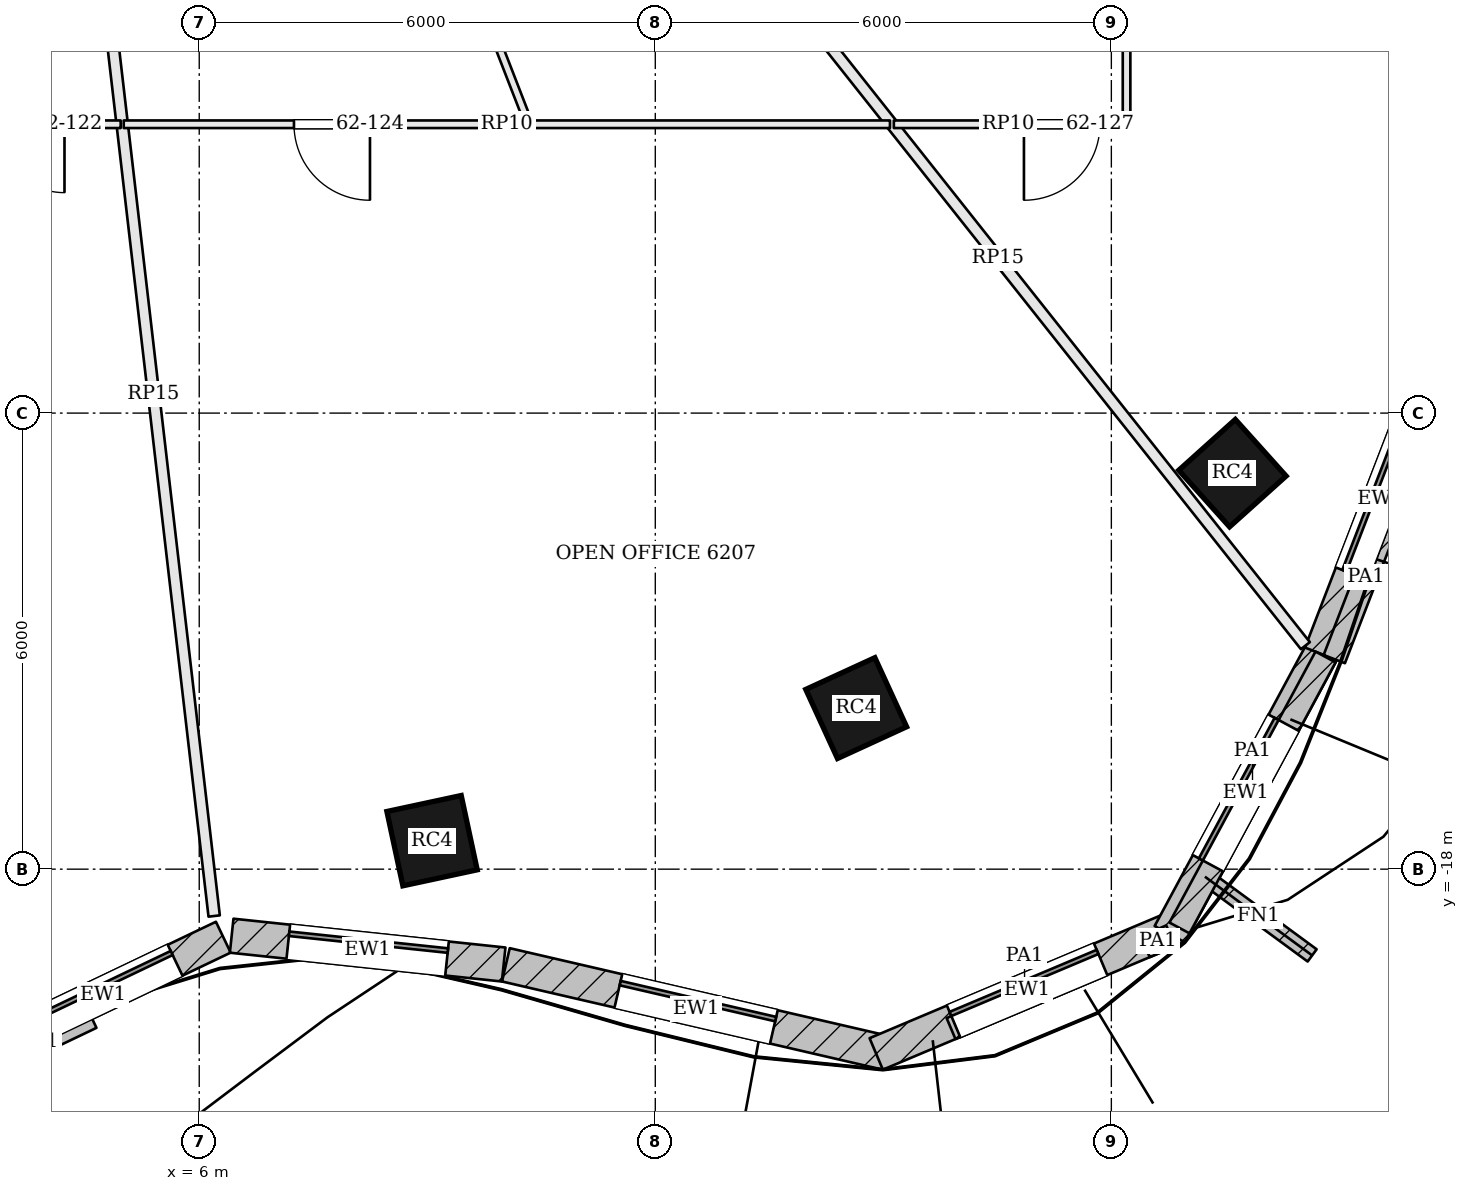
"""IFC4 building model, lengths in metres.
Left out: names, types, materials, properties, quantities, classifications, styles, units other than length and angle.
Written with IfcOpenShell. Run it as: python <this file> out.ifc"""

import sys

from ifc_helpers import new_model, si_unit, direction, frame, frame_2d, origin, origin_2d, place, context, subcontext, project, spatial, rectangle, extrude, element, fill, save


model = new_model("IFC4")
c1 = context("Model", 3, precision=1e-05, world=origin(), true_north=direction((0.0, 1.0)))
c2 = subcontext(c1, "Body", "Model", "MODEL_VIEW")
j1 = project(units=[si_unit("LENGTHUNIT", "METRE"), si_unit("PLANEANGLEUNIT", "RADIAN")], contexts=[c1])
p1 = place(None, origin())
s1 = spatial("IfcSite", under=j1, at=p1, CompositionType="ELEMENT")
p2 = place(p1, origin())
s2 = spatial("IfcBuilding", under=s1, at=p2, CompositionType="ELEMENT")
p3 = place(p2, frame((0.0, 0.0, 252.6)))
s3 = spatial("IfcBuildingStorey", under=s2, at=p3, CompositionType="ELEMENT", Elevation=252.6)
for number, where, z_axis, x_axis in (
    (1, (9.063, -17.625, 0.0), (0.0, 0.0, 1.0), (0.978, 0.21, 0.0)),
    (2, (14.643, -15.881, 0.0), (0.0, 0.0, 1.0), (0.909, 0.417, 0.0)),
    (3, (19.593, -12.79, 0.0), (0.0, 0.0, 1.0), (0.744, 0.668, 0.0)),
):
    element("IfcColumn", number, at=place(p3, frame(where, z_axis=z_axis, x_axis=x_axis)), inside=s3, PredefinedType="COLUMN", context=c2, shape_type="SweptSolid", body=[
        extrude(rectangle(XDim=1.0, YDim=1.0, at=origin_2d()), origin(), (0.0, 0.0, 1.0), 3.9),
    ])
p4 = place(p3, frame((3.154, -20.406, 0.0), z_axis=(0.0, 0.0, 1.0), x_axis=(0.902333313, 0.431038968367, 0.0)))
e4 = element("IfcWall", 4, at=p4, inside=s3, PredefinedType="SOLIDWALL", context=c2, shape_type="SweptSolid", body=[
    extrude(rectangle(XDim=3.505, YDim=0.45, at=frame_2d((1.753, 0.0))), origin(), (0.0, 0.0, 1.0), 3.7),
])
p5 = place(p4, frame((0.703, 0.0, 0.9)))
e5 = element("IfcOpeningElement", 5, at=p5, cuts=e4, PredefinedType="OPENING", context=c2, shape_type="SweptSolid", body=[
    extrude(rectangle(XDim=2.1, YDim=2.3, at=frame_2d((1.05, 1.15))), frame((0.0, 0.235, 0.0), z_axis=(0.0, -1.0, 0.0), x_axis=(1.0, 0.0, 0.0)), (0.0, 0.0, 1.0), 0.47),
])
p6 = place(p3, frame((6.427, -18.875, 0.0), z_axis=(0.0, 0.0, 1.0), x_axis=(0.994433468803, -0.10536638992, 0.0)))
e6 = element("IfcWall", 6, at=p6, inside=s3, PredefinedType="SOLIDWALL", context=c2, shape_type="SweptSolid", body=[
    extrude(rectangle(XDim=3.598, YDim=0.45, at=frame_2d((1.799, 0.0))), origin(), (0.0, 0.0, 1.0), 3.7),
])
p7 = place(p6, frame((0.749, 0.0, 0.9)))
e7 = element("IfcOpeningElement", 7, at=p7, cuts=e6, PredefinedType="OPENING", context=c2, shape_type="SweptSolid", body=[
    extrude(rectangle(XDim=2.1, YDim=2.3, at=frame_2d((1.05, 1.15))), frame((0.0, 0.235, 0.0), z_axis=(0.0, -1.0, 0.0), x_axis=(1.0, 0.0, 0.0)), (0.0, 0.0, 1.0), 0.47),
])
p8 = place(p3, frame((10.034, -19.259, 0.0), z_axis=(0.0, 0.0, 1.0), x_axis=(0.974223567844, -0.225584662283, 0.0)))
e8 = element("IfcWall", 8, at=p8, inside=s3, PredefinedType="SOLIDWALL", context=c2, shape_type="SweptSolid", body=[
    extrude(rectangle(XDim=5.139, YDim=0.45, at=frame_2d((2.569, 0.0))), origin(), (0.0, 0.0, 1.0), 3.7),
])
p9 = place(p8, frame((1.519, 0.0, 0.9)))
e9 = element("IfcOpeningElement", 9, at=p9, cuts=e8, PredefinedType="OPENING", context=c2, shape_type="SweptSolid", body=[
    extrude(rectangle(XDim=2.1, YDim=2.3, at=frame_2d((1.05, 1.15))), frame((0.0, 0.235, 0.0), z_axis=(0.0, -1.0, 0.0), x_axis=(1.0, 0.0, 0.0)), (0.0, 0.0, 1.0), 0.47),
])
p10 = place(p3, frame((14.906, -20.431, 0.0), z_axis=(0.0, 0.0, 1.0), x_axis=(0.921435803521, 0.388530642279, 0.0)))
e10 = element("IfcWall", 10, at=p10, inside=s3, PredefinedType="SOLIDWALL", context=c2, shape_type="SweptSolid", body=[
    extrude(rectangle(XDim=4.309, YDim=0.45, at=frame_2d((2.154, 0.0))), origin(), (0.0, 0.0, 1.0), 3.7),
])
p11 = place(p10, frame((1.104, 0.0, 0.9)))
e11 = element("IfcOpeningElement", 11, at=p11, cuts=e10, PredefinedType="OPENING", context=c2, shape_type="SweptSolid", body=[
    extrude(rectangle(XDim=2.1, YDim=2.3, at=frame_2d((1.05, 1.15))), frame((0.0, 0.235, 0.0), z_axis=(0.0, -1.0, 0.0), x_axis=(1.0, 0.0, 0.0)), (0.0, 0.0, 1.0), 0.47),
])
p12 = place(p3, frame((18.767, -18.854, 0.0), z_axis=(0.0, 0.0, 1.0), x_axis=(0.474475888716, 0.880268499395, 0.0)))
e12 = element("IfcWall", 12, at=p12, inside=s3, PredefinedType="SOLIDWALL", context=c2, shape_type="SweptSolid", body=[
    extrude(rectangle(XDim=4.219, YDim=0.45, at=frame_2d((2.11, 0.0))), origin(), (0.0, 0.0, 1.0), 3.7),
])
p13 = place(p12, frame((1.06, 0.0, 0.9)))
e13 = element("IfcOpeningElement", 13, at=p13, cuts=e12, PredefinedType="OPENING", context=c2, shape_type="SweptSolid", body=[
    extrude(rectangle(XDim=2.1, YDim=2.3, at=frame_2d((1.05, 1.15))), frame((0.0, 0.235, 0.0), z_axis=(0.0, -1.0, 0.0), x_axis=(1.0, 0.0, 0.0)), (0.0, 0.0, 1.0), 0.47),
])
p14 = place(p3, frame((20.757, -15.166, 0.0), z_axis=(0.0, 0.0, 1.0), x_axis=(0.360067043581, 0.932926430179, 0.0)))
e14 = element("IfcWall", 14, at=p14, inside=s3, PredefinedType="SOLIDWALL", context=c2, shape_type="SweptSolid", body=[
    extrude(rectangle(XDim=4.36, YDim=0.45, at=frame_2d((2.18, 0.0))), origin(), (0.0, 0.0, 1.0), 3.7),
])
p15 = place(p14, frame((1.13, 0.0, 0.9)))
e15 = element("IfcOpeningElement", 15, at=p15, cuts=e14, PredefinedType="OPENING", context=c2, shape_type="SweptSolid", body=[
    extrude(rectangle(XDim=2.1, YDim=2.3, at=frame_2d((1.05, 1.15))), frame((0.0, 0.235, 0.0), z_axis=(0.0, -1.0, 0.0), x_axis=(1.0, 0.0, 0.0)), (0.0, 0.0, 1.0), 0.47),
])
p16 = place(p3, frame((19.231, -18.099, 0.0), z_axis=(0.0, 0.0, 1.0), x_axis=(0.806085538754, -0.591799040394, 0.0)))
e16 = element("IfcWall", 16, at=p16, inside=s3, PredefinedType="SOLIDWALL", context=c2, shape_type="SweptSolid", body=[
    extrude(rectangle(XDim=1.75, YDim=0.2, at=frame_2d((0.875, 0.0))), origin(), (0.0, 0.0, 1.0), 3.7),
])
p17 = place(p3, frame((3.239, -20.594, 3.9), z_axis=(0.0, 0.0, 1.0), x_axis=(0.902344893923, 0.431014724123, 0.0)))
e17 = element("IfcWall", 17, at=p17, inside=s3, PredefinedType="PARAPET", context=c2, shape_type="SweptSolid", body=[
    extrude(rectangle(XDim=1.49, YDim=0.3, at=frame_2d((0.745, 0.0))), origin(), (0.0, 0.0, 1.0), 1.1),
])
p18 = place(p3, frame((15.891, -20.097, 3.9), z_axis=(0.0, 0.0, 1.0), x_axis=(0.921468908678, 0.388452121038, 0.0)))
e18 = element("IfcWall", 18, at=p18, inside=s3, PredefinedType="PARAPET", context=c2, shape_type="SweptSolid", body=[
    extrude(rectangle(XDim=2.099, YDim=0.3, at=frame_2d((1.05, 0.0))), origin(), (0.0, 0.0, 1.0), 1.1),
])
p19 = place(p3, frame((18.446, -19.02, 3.9), z_axis=(0.0, 0.0, 1.0), x_axis=(0.921356634102, 0.388718346358, 0.0)))
e19 = element("IfcWall", 19, at=p19, inside=s3, PredefinedType="PARAPET", context=c2, shape_type="SweptSolid", body=[
    extrude(rectangle(XDim=0.363, YDim=0.3, at=frame_2d((0.182, 0.0))), origin(), (0.0, 0.0, 1.0), 1.1),
])
p20 = place(p3, frame((18.896, -18.773, 3.9), z_axis=(0.0, 0.0, 1.0), x_axis=(0.474444905835, 0.880285198857, 0.0)))
e20 = element("IfcWall", 20, at=p20, inside=s3, PredefinedType="PARAPET", context=c2, shape_type="SweptSolid", body=[
    extrude(rectangle(XDim=4.05, YDim=0.3, at=frame_2d((2.025, 0.0))), origin(), (0.0, 0.0, 1.0), 1.1),
])
p21 = place(p3, frame((20.933, -15.237, 3.9), z_axis=(0.0, 0.0, 1.0), x_axis=(0.360021038217, 0.932944184848, 0.0)))
e21 = element("IfcWall", 21, at=p21, inside=s3, PredefinedType="PARAPET", context=c2, shape_type="SweptSolid", body=[
    extrude(rectangle(XDim=2.323, YDim=0.3, at=frame_2d((1.162, 0.0))), origin(), (0.0, 0.0, 1.0), 1.1),
])
p22 = place(p3, frame((6.197, -18.616, 0.0), z_axis=(0.0, 0.0, 1.0), x_axis=(-0.115396385648, 0.993319522701, 0.0)))
e22 = element("IfcWall", 22, at=p22, inside=s3, PredefinedType="PARTITIONING", context=c2, shape_type="SweptSolid", body=[
    extrude(rectangle(XDim=13.834, YDim=0.15, at=frame_2d((6.917, 0.0))), origin(), (0.0, 0.0, 1.0), 3.084),
])
p23 = place(p3, frame((20.553, -15.059, 0.0), z_axis=(0.0, 0.0, 1.0), x_axis=(-0.621387168857, 0.783503660732, 0.0)))
e23 = element("IfcWall", 23, at=p23, inside=s3, PredefinedType="PARTITIONING", context=c2, shape_type="SweptSolid", body=[
    extrude(rectangle(XDim=13.019, YDim=0.15, at=frame_2d((6.51, 0.0))), origin(), (0.0, 0.0, 1.0), 3.084),
])
p24 = place(p3, frame((4.966, -8.2, 0.0), z_axis=(0.0, 0.0, 1.0), x_axis=(-1.0, 0.0, 0.0)))
e24 = element("IfcWall", 24, at=p24, inside=s3, PredefinedType="PARTITIONING", context=c2, shape_type="SweptSolid", body=[
    extrude(rectangle(XDim=9.919, YDim=0.1, at=frame_2d((4.959, 0.0))), origin(), (0.0, 0.0, 1.0), 3.084),
])
p25 = place(p24, frame((7.037, 0.0, 0.0)))
e25 = element("IfcOpeningElement", 25, at=p25, cuts=e24, PredefinedType="OPENING", context=c2, shape_type="SweptSolid", body=[
    extrude(rectangle(XDim=1.0, YDim=2.1, at=frame_2d((0.5, 1.05))), frame((0.0, 0.06, 0.0), z_axis=(0.0, -1.0, 0.0), x_axis=(1.0, 0.0, 0.0)), (0.0, 0.0, 1.0), 0.12),
])
p26 = place(p24, frame((0.739, 0.0, 0.0)))
e26 = element("IfcOpeningElement", 26, at=p26, cuts=e24, PredefinedType="OPENING", context=c2, shape_type="SweptSolid", body=[
    extrude(rectangle(XDim=0.9, YDim=2.1, at=frame_2d((0.45, 1.05))), frame((0.0, 0.06, 0.0), z_axis=(0.0, -1.0, 0.0), x_axis=(1.0, 0.0, 0.0)), (0.0, 0.0, 1.0), 0.12),
])
p27 = place(p3, frame((15.087, -8.2, 0.0), z_axis=(0.0, 0.0, 1.0), x_axis=(-1.0, 0.0, 0.0)))
e27 = element("IfcWall", 27, at=p27, inside=s3, PredefinedType="PARTITIONING", context=c2, shape_type="SweptSolid", body=[
    extrude(rectangle(XDim=10.081, YDim=0.1, at=frame_2d((5.041, 0.0))), origin(), (0.0, 0.0, 1.0), 3.084),
])
p28 = place(p27, frame((6.841, 0.0, 0.0)))
e28 = element("IfcOpeningElement", 28, at=p28, cuts=e27, PredefinedType="OPENING", context=c2, shape_type="SweptSolid", body=[
    extrude(rectangle(XDim=1.0, YDim=2.1, at=frame_2d((0.5, 1.05))), frame((0.0, 0.06, 0.0), z_axis=(0.0, -1.0, 0.0), x_axis=(1.0, 0.0, 0.0)), (0.0, 0.0, 1.0), 0.12),
])
p29 = place(p3, frame((9.046, -4.87, 0.0), z_axis=(0.0, 0.0, 1.0), x_axis=(0.361773794961, -0.93226590696, 0.0)))
e29 = element("IfcWall", 29, at=p29, inside=s3, PredefinedType="PARTITIONING", context=c2, shape_type="SweptSolid", body=[
    extrude(rectangle(XDim=3.522, YDim=0.1, at=frame_2d((1.761, 0.0))), origin(), (0.0, 0.0, 1.0), 3.084),
])
p30 = place(p3, frame((18.2, 2.74, 0.0), z_axis=(0.0, 0.0, 1.0), x_axis=(0.0, -1.0, 0.0)))
e30 = element("IfcWall", 30, at=p30, inside=s3, PredefinedType="PARTITIONING", context=c2, shape_type="SweptSolid", body=[
    extrude(rectangle(XDim=10.939, YDim=0.1, at=frame_2d((5.47, 0.0))), origin(), (0.0, 0.0, 1.0), 3.084),
])
p31 = place(p3, frame((18.15, -8.2, 0.0), z_axis=(0.0, 0.0, 1.0), x_axis=(-1.0, 0.0, 0.0)))
e31 = element("IfcWall", 31, at=p31, inside=s3, PredefinedType="PARTITIONING", context=c2, shape_type="SweptSolid", body=[
    extrude(rectangle(XDim=3.011, YDim=0.1, at=frame_2d((1.506, 0.0))), origin(), (0.0, 0.0, 1.0), 3.084),
])
p32 = place(p31, frame((0.3, 0.0, 0.0)))
e32 = element("IfcOpeningElement", 32, at=p32, cuts=e31, PredefinedType="OPENING", context=c2, shape_type="SweptSolid", body=[
    extrude(rectangle(XDim=1.0, YDim=2.1, at=frame_2d((0.5, 1.05))), frame((0.0, 0.06, 0.0), z_axis=(0.0, -1.0, 0.0), x_axis=(1.0, 0.0, 0.0)), (0.0, 0.0, 1.0), 0.12),
])
p33 = place(p5, origin())
e33 = element("IfcWindow", 33, at=p33, inside=s3, PartitioningType="SINGLE_PANEL", PredefinedType="WINDOW", context=c2, shape_type="SweptSolid", body=[
    extrude(rectangle(XDim=2.1, YDim=2.3, at=frame_2d((1.05, 1.15))), frame((0.0, 0.135, 0.0), z_axis=(0.0, -1.0, 0.0), x_axis=(1.0, 0.0, 0.0)), (0.0, 0.0, 1.0), 0.06),
])
fill(e5, e33)
p34 = place(p7, origin())
e34 = element("IfcWindow", 34, at=p34, inside=s3, PartitioningType="SINGLE_PANEL", PredefinedType="WINDOW", context=c2, shape_type="SweptSolid", body=[
    extrude(rectangle(XDim=2.1, YDim=2.3, at=frame_2d((1.05, 1.15))), frame((0.0, 0.135, 0.0), z_axis=(0.0, -1.0, 0.0), x_axis=(1.0, 0.0, 0.0)), (0.0, 0.0, 1.0), 0.06),
])
fill(e7, e34)
p35 = place(p9, origin())
e35 = element("IfcWindow", 35, at=p35, inside=s3, PartitioningType="SINGLE_PANEL", PredefinedType="WINDOW", context=c2, shape_type="SweptSolid", body=[
    extrude(rectangle(XDim=2.1, YDim=2.3, at=frame_2d((1.05, 1.15))), frame((0.0, 0.135, 0.0), z_axis=(0.0, -1.0, 0.0), x_axis=(1.0, 0.0, 0.0)), (0.0, 0.0, 1.0), 0.06),
])
fill(e9, e35)
p36 = place(p11, origin())
e36 = element("IfcWindow", 36, at=p36, inside=s3, PartitioningType="SINGLE_PANEL", PredefinedType="WINDOW", context=c2, shape_type="SweptSolid", body=[
    extrude(rectangle(XDim=2.1, YDim=2.3, at=frame_2d((1.05, 1.15))), frame((0.0, 0.135, 0.0), z_axis=(0.0, -1.0, 0.0), x_axis=(1.0, 0.0, 0.0)), (0.0, 0.0, 1.0), 0.06),
])
fill(e11, e36)
p37 = place(p13, origin())
e37 = element("IfcWindow", 37, at=p37, inside=s3, PartitioningType="SINGLE_PANEL", PredefinedType="WINDOW", context=c2, shape_type="SweptSolid", body=[
    extrude(rectangle(XDim=2.1, YDim=2.3, at=frame_2d((1.05, 1.15))), frame((0.0, 0.135, 0.0), z_axis=(0.0, -1.0, 0.0), x_axis=(1.0, 0.0, 0.0)), (0.0, 0.0, 1.0), 0.06),
])
fill(e13, e37)
p38 = place(p15, origin())
e38 = element("IfcWindow", 38, at=p38, inside=s3, PartitioningType="SINGLE_PANEL", PredefinedType="WINDOW", context=c2, shape_type="SweptSolid", body=[
    extrude(rectangle(XDim=2.1, YDim=2.3, at=frame_2d((1.05, 1.15))), frame((0.0, 0.135, 0.0), z_axis=(0.0, -1.0, 0.0), x_axis=(1.0, 0.0, 0.0)), (0.0, 0.0, 1.0), 0.06),
])
fill(e15, e38)
p39 = place(p26, origin())
e39 = element("IfcDoor", 39, at=p39, inside=s3, OperationType="SINGLE_SWING_LEFT", PredefinedType="DOOR", context=c2, shape_type="SweptSolid", body=[
    extrude(rectangle(XDim=0.9, YDim=2.1, at=frame_2d((0.45, 1.05))), frame((0.0, 0.025, 0.0), z_axis=(0.0, -1.0, 0.0), x_axis=(1.0, 0.0, 0.0)), (0.0, 0.0, 1.0), 0.05),
])
fill(e26, e39)
p40 = place(p28, origin())
e40 = element("IfcDoor", 40, at=p40, inside=s3, OperationType="SINGLE_SWING_LEFT", PredefinedType="DOOR", context=c2, shape_type="SweptSolid", body=[
    extrude(rectangle(XDim=1.0, YDim=2.1, at=frame_2d((0.5, 1.05))), frame((0.0, 0.025, 0.0), z_axis=(0.0, -1.0, 0.0), x_axis=(1.0, 0.0, 0.0)), (0.0, 0.0, 1.0), 0.05),
])
fill(e28, e40)
p41 = place(p32, origin())
e41 = element("IfcDoor", 41, at=p41, inside=s3, OperationType="SINGLE_SWING_RIGHT", PredefinedType="DOOR", context=c2, shape_type="SweptSolid", body=[
    extrude(rectangle(XDim=1.0, YDim=2.1, at=frame_2d((0.5, 1.05))), frame((0.0, 0.025, 0.0), z_axis=(0.0, -1.0, 0.0), x_axis=(1.0, 0.0, 0.0)), (0.0, 0.0, 1.0), 0.05),
])
fill(e32, e41)
save(model, sys.argv[1])
